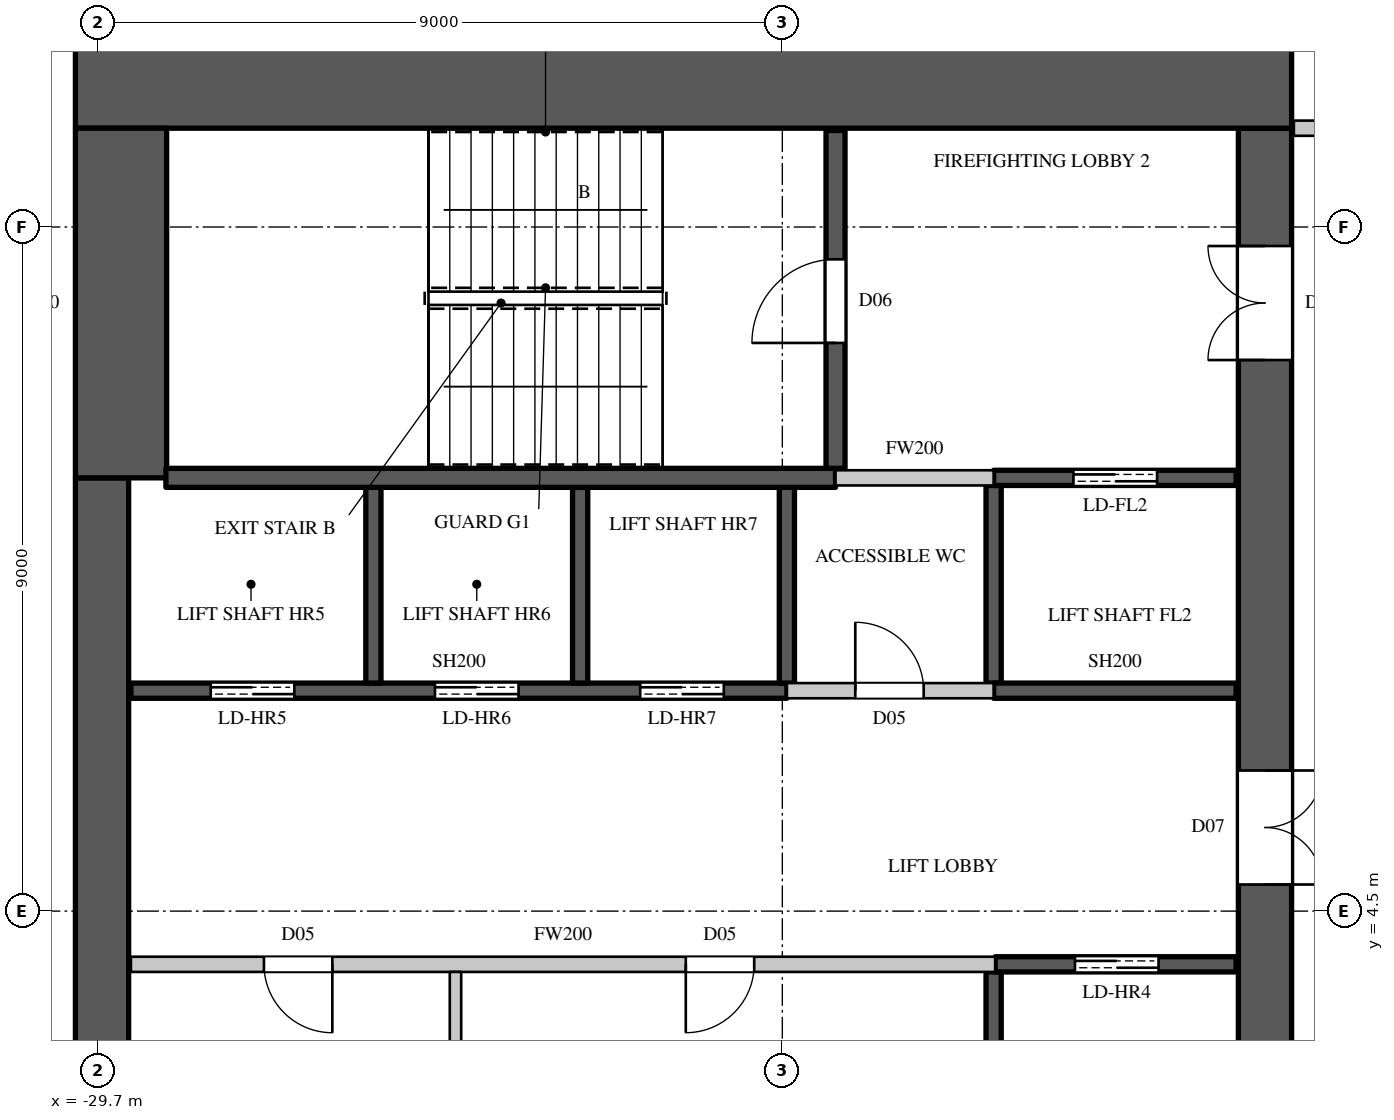
"""IFC4 building model, lengths in metres.
Left out: names, types, materials, properties, quantities, classifications, styles, units other than length and angle.
Written with IfcOpenShell. Run it as: python <this file> out.ifc"""

import sys

from ifc_helpers import new_model, si_unit, direction, frame, frame_2d, origin, place, context, subcontext, project, spatial, rectangle, extrude, element, fill, save


model = new_model("IFC4")
c1 = context("Model", 3, precision=1e-05, world=origin(), true_north=direction((0.0, 1.0)))
c2 = subcontext(c1, "Body", "Model", "MODEL_VIEW")
j1 = project(units=[si_unit("LENGTHUNIT", "METRE"), si_unit("PLANEANGLEUNIT", "RADIAN")], contexts=[c1])
p1 = place(None, origin())
s1 = spatial("IfcSite", under=j1, at=p1, CompositionType="ELEMENT")
p2 = place(p1, origin())
s2 = spatial("IfcBuilding", under=s1, at=p2, CompositionType="ELEMENT")
p3 = place(p2, frame((0.0, 0.0, 259.8)))
s3 = spatial("IfcBuildingStorey", under=s2, at=p3, CompositionType="ELEMENT", Elevation=259.8)
p4 = place(p3, frame((-30.0, 15.4, 0.0), z_axis=(0.0, 0.0, 1.0), x_axis=(1.0, 0.0, 0.0)))
e1 = element("IfcWall", 1, at=p4, inside=s3, PredefinedType="SHEAR", context=c2, shape_type="SweptSolid", body=[
    extrude(rectangle(XDim=16.0, YDim=1.2, at=frame_2d((8.0, 0.0))), origin(), (0.0, 0.0, 1.0), 4.1),
])
p5 = place(p3, frame((-14.35, -14.8, 0.0), z_axis=(0.0, 0.0, 1.0), x_axis=(0.0, 1.0, 0.0)))
e2 = element("IfcWall", 2, at=p5, inside=s3, PredefinedType="SHEAR", context=c2, shape_type="SweptSolid", body=[
    extrude(rectangle(XDim=29.6, YDim=0.7, at=frame_2d((14.8, 0.0))), origin(), (0.0, 0.0, 1.0), 4.1),
])
p6 = place(p5, frame((1.55, 0.0, 0.0)))
e3 = element("IfcOpeningElement", 3, at=p6, cuts=e2, PredefinedType="OPENING", context=c2, shape_type="SweptSolid", body=[
    extrude(rectangle(XDim=1.5, YDim=2.4, at=frame_2d((0.75, 1.2))), frame((0.0, 0.36, 0.0), z_axis=(0.0, -1.0, 0.0), x_axis=(1.0, 0.0, 0.0)), (0.0, 0.0, 1.0), 0.72),
])
p7 = place(p5, frame((26.55, 0.0, 0.0)))
e4 = element("IfcOpeningElement", 4, at=p7, cuts=e2, PredefinedType="OPENING", context=c2, shape_type="SweptSolid", body=[
    extrude(rectangle(XDim=1.5, YDim=2.4, at=frame_2d((0.75, 1.2))), frame((0.0, 0.36, 0.0), z_axis=(0.0, -1.0, 0.0), x_axis=(1.0, 0.0, 0.0)), (0.0, 0.0, 1.0), 0.72),
])
p8 = place(p5, frame((8.45, 0.0, 0.0)))
e5 = element("IfcOpeningElement", 5, at=p8, cuts=e2, PredefinedType="OPENING", context=c2, shape_type="SweptSolid", body=[
    extrude(rectangle(XDim=1.5, YDim=2.4, at=frame_2d((0.75, 1.2))), frame((0.0, 0.36, 0.0), z_axis=(0.0, -1.0, 0.0), x_axis=(1.0, 0.0, 0.0)), (0.0, 0.0, 1.0), 0.72),
])
p9 = place(p5, frame((19.65, 0.0, 0.0)))
e6 = element("IfcOpeningElement", 6, at=p9, cuts=e2, PredefinedType="OPENING", context=c2, shape_type="SweptSolid", body=[
    extrude(rectangle(XDim=1.5, YDim=2.4, at=frame_2d((0.75, 1.2))), frame((0.0, 0.36, 0.0), z_axis=(0.0, -1.0, 0.0), x_axis=(1.0, 0.0, 0.0)), (0.0, 0.0, 1.0), 0.72),
])
p10 = place(p5, frame((14.5, 0.0, 0.0)))
e7 = element("IfcOpeningElement", 7, at=p10, cuts=e2, PredefinedType="OPENING", context=c2, shape_type="SweptSolid", body=[
    extrude(rectangle(XDim=0.6, YDim=2.0, at=frame_2d((0.3, 1.0))), frame((0.0, 0.36, 0.0), z_axis=(0.0, -1.0, 0.0), x_axis=(1.0, 0.0, 0.0)), (0.0, 0.0, 1.0), 0.72),
])
p11 = place(p3, frame((-29.65, -10.2, 0.0), z_axis=(0.0, 0.0, 1.0), x_axis=(0.0, 1.0, 0.0)))
e8 = element("IfcWall", 8, at=p11, inside=s3, PredefinedType="SHEAR", context=c2, shape_type="SweptSolid", body=[
    extrude(rectangle(XDim=20.4, YDim=0.7, at=frame_2d((10.2, 0.0))), origin(), (0.0, 0.0, 1.0), 4.1),
])
p12 = place(p3, frame((-29.4, 10.2, 0.0), z_axis=(0.0, 0.0, 1.0), x_axis=(0.0, 1.0, 0.0)))
e9 = element("IfcWall", 9, at=p12, inside=s3, PredefinedType="SHEAR", context=c2, shape_type="SweptSolid", body=[
    extrude(rectangle(XDim=4.6, YDim=1.2, at=frame_2d((2.3, 0.0))), origin(), (0.0, 0.0, 1.0), 4.1),
])
p13 = place(p3, frame((-29.27, 3.8, 0.0), z_axis=(0.0, 0.0, 1.0), x_axis=(1.0, 0.0, 0.0)))
e10 = element("IfcWall", 10, at=p13, inside=s3, PredefinedType="PARTITIONING", context=c2, shape_type="SweptSolid", body=[
    extrude(rectangle(XDim=11.37, YDim=0.2, at=frame_2d((5.685, 0.0))), origin(), (0.0, 0.0, 1.0), 3.8),
])
p14 = place(p13, frame((1.75, 0.0, 0.0)))
e11 = element("IfcOpeningElement", 11, at=p14, cuts=e10, PredefinedType="OPENING", context=c2, shape_type="SweptSolid", body=[
    extrude(rectangle(XDim=0.9, YDim=2.2, at=frame_2d((0.45, 1.1))), frame((0.0, 0.11, 0.0), z_axis=(0.0, -1.0, 0.0), x_axis=(1.0, 0.0, 0.0)), (0.0, 0.0, 1.0), 0.22),
])
p15 = place(p13, frame((7.3, 0.0, 0.0)))
e12 = element("IfcOpeningElement", 12, at=p15, cuts=e10, PredefinedType="OPENING", context=c2, shape_type="SweptSolid", body=[
    extrude(rectangle(XDim=0.9, YDim=2.2, at=frame_2d((0.45, 1.1))), frame((0.0, 0.11, 0.0), z_axis=(0.0, -1.0, 0.0), x_axis=(1.0, 0.0, 0.0)), (0.0, 0.0, 1.0), 0.22),
])
p16 = place(p3, frame((-20.64, 7.4, 0.0), z_axis=(0.0, 0.0, 1.0), x_axis=(1.0, 0.0, 0.0)))
e13 = element("IfcWall", 13, at=p16, inside=s3, PredefinedType="PARTITIONING", context=c2, shape_type="SweptSolid", body=[
    extrude(rectangle(XDim=2.72, YDim=0.2, at=frame_2d((1.36, 0.0))), origin(), (0.0, 0.0, 1.0), 3.8),
])
p17 = place(p16, frame((0.9, 0.0, 0.0)))
e14 = element("IfcOpeningElement", 14, at=p17, cuts=e13, PredefinedType="OPENING", context=c2, shape_type="SweptSolid", body=[
    extrude(rectangle(XDim=0.9, YDim=2.2, at=frame_2d((0.45, 1.1))), frame((0.0, 0.11, 0.0), z_axis=(0.0, -1.0, 0.0), x_axis=(1.0, 0.0, 0.0)), (0.0, 0.0, 1.0), 0.22),
])
p18 = place(p3, frame((-20.0, 10.2, 0.0), z_axis=(0.0, 0.0, 1.0), x_axis=(1.0, 0.0, 0.0)))
e15 = element("IfcWall", 15, at=p18, inside=s3, PredefinedType="PARTITIONING", context=c2, shape_type="SweptSolid", body=[
    extrude(rectangle(XDim=2.08, YDim=0.2, at=frame_2d((1.04, 0.0))), origin(), (0.0, 0.0, 1.0), 3.8),
])
p19 = place(p3, frame((-13.97, 14.8, 0.0), z_axis=(0.0, 0.0, 1.0), x_axis=(1.0, 0.0, 0.0)))
e16 = element("IfcWall", 16, at=p19, inside=s3, PredefinedType="PARTITIONING", context=c2, shape_type="SweptSolid", body=[
    extrude(rectangle(XDim=3.07, YDim=0.2, at=frame_2d((1.535, 0.0))), origin(), (0.0, 0.0, 1.0), 3.8),
])
p20 = place(p3, frame((-25.0, 1.1, 0.0), z_axis=(0.0, 0.0, 1.0), x_axis=(0.0, 1.0, 0.0)))
e17 = element("IfcWall", 17, at=p20, inside=s3, PredefinedType="PARTITIONING", context=c2, shape_type="SweptSolid", body=[
    extrude(rectangle(XDim=2.6, YDim=0.15, at=frame_2d((1.3, 0.0))), origin(), (0.0, 0.0, 1.0), 3.8),
])
p21 = place(p3, frame((-29.27, 7.4, 0.0), z_axis=(0.0, 0.0, 1.0), x_axis=(1.0, 0.0, 0.0)))
e18 = element("IfcWall", 18, at=p21, inside=s3, PredefinedType="SHEAR", context=c2, shape_type="SweptSolid", body=[
    extrude(rectangle(XDim=8.63, YDim=0.2, at=frame_2d((4.315, 0.0))), origin(), (0.0, 0.0, 1.0), 3.8),
])
p22 = place(p21, frame((1.05, 0.0, 0.0)))
e19 = element("IfcOpeningElement", 19, at=p22, cuts=e18, PredefinedType="OPENING", context=c2, shape_type="SweptSolid", body=[
    extrude(rectangle(XDim=1.1, YDim=2.2, at=frame_2d((0.55, 1.1))), frame((0.0, 0.11, 0.0), z_axis=(0.0, -1.0, 0.0), x_axis=(1.0, 0.0, 0.0)), (0.0, 0.0, 1.0), 0.22),
])
p23 = place(p21, frame((4.0, 0.0, 0.0)))
e20 = element("IfcOpeningElement", 20, at=p23, cuts=e18, PredefinedType="OPENING", context=c2, shape_type="SweptSolid", body=[
    extrude(rectangle(XDim=1.1, YDim=2.2, at=frame_2d((0.55, 1.1))), frame((0.0, 0.11, 0.0), z_axis=(0.0, -1.0, 0.0), x_axis=(1.0, 0.0, 0.0)), (0.0, 0.0, 1.0), 0.22),
])
p24 = place(p21, frame((6.7, 0.0, 0.0)))
e21 = element("IfcOpeningElement", 21, at=p24, cuts=e18, PredefinedType="OPENING", context=c2, shape_type="SweptSolid", body=[
    extrude(rectangle(XDim=1.1, YDim=2.2, at=frame_2d((0.55, 1.1))), frame((0.0, 0.11, 0.0), z_axis=(0.0, -1.0, 0.0), x_axis=(1.0, 0.0, 0.0)), (0.0, 0.0, 1.0), 0.22),
])
for number, where, z_axis, x_axis in (
    (22, (-26.08, 7.5, 0.0), (0.0, 0.0, 1.0), (0.0, 1.0, 0.0)),
    (23, (-23.36, 7.5, 0.0), (0.0, 0.0, 1.0), (0.0, 1.0, 0.0)),
):
    element("IfcWall", number, at=place(p3, frame(where, z_axis=z_axis, x_axis=x_axis)), inside=s3, PredefinedType="SHEAR", context=c2, shape_type="SweptSolid", body=[
        extrude(rectangle(XDim=2.575, YDim=0.2, at=frame_2d((1.288, 0.0))), origin(), (0.0, 0.0, 1.0), 4.1),
    ])
p25 = place(p3, frame((-20.64, 7.5, 0.0), z_axis=(0.0, 0.0, 1.0), x_axis=(0.0, 1.0, 0.0)))
e24 = element("IfcWall", 24, at=p25, inside=s3, PredefinedType="SHEAR", context=c2, shape_type="SweptSolid", body=[
    extrude(rectangle(XDim=2.575, YDim=0.2, at=frame_2d((1.288, 0.0))), origin(), (0.0, 0.0, 1.0), 3.8),
])
p26 = place(p3, frame((-17.92, 1.1, 0.0), z_axis=(0.0, 0.0, 1.0), x_axis=(0.0, 1.0, 0.0)))
e25 = element("IfcWall", 25, at=p26, inside=s3, PredefinedType="SHEAR", context=c2, shape_type="SweptSolid", body=[
    extrude(rectangle(XDim=2.6, YDim=0.2, at=frame_2d((1.3, 0.0))), origin(), (0.0, 0.0, 1.0), 3.8),
])
p27 = place(p3, frame((-17.9, 3.8, 0.0), z_axis=(0.0, 0.0, 1.0), x_axis=(1.0, 0.0, 0.0)))
e26 = element("IfcWall", 26, at=p27, inside=s3, PredefinedType="SHEAR", context=c2, shape_type="SweptSolid", body=[
    extrude(rectangle(XDim=3.17, YDim=0.2, at=frame_2d((1.585, 0.0))), origin(), (0.0, 0.0, 1.0), 3.8),
])
p28 = place(p27, frame((1.05, 0.0, 0.0)))
e27 = element("IfcOpeningElement", 27, at=p28, cuts=e26, PredefinedType="OPENING", context=c2, shape_type="SweptSolid", body=[
    extrude(rectangle(XDim=1.1, YDim=2.2, at=frame_2d((0.55, 1.1))), frame((0.0, 0.11, 0.0), z_axis=(0.0, -1.0, 0.0), x_axis=(1.0, 0.0, 0.0)), (0.0, 0.0, 1.0), 0.22),
])
p29 = place(p3, frame((-17.92, 7.5, 0.0), z_axis=(0.0, 0.0, 1.0), x_axis=(0.0, 1.0, 0.0)))
e28 = element("IfcWall", 28, at=p29, inside=s3, PredefinedType="SHEAR", context=c2, shape_type="SweptSolid", body=[
    extrude(rectangle(XDim=2.6, YDim=0.2, at=frame_2d((1.3, 0.0))), origin(), (0.0, 0.0, 1.0), 3.8),
])
p30 = place(p3, frame((-17.92, 7.4, 0.0), z_axis=(0.0, 0.0, 1.0), x_axis=(1.0, 0.0, 0.0)))
e29 = element("IfcWall", 29, at=p30, inside=s3, PredefinedType="SHEAR", context=c2, shape_type="SweptSolid", body=[
    extrude(rectangle(XDim=3.19, YDim=0.2, at=frame_2d((1.595, 0.0))), origin(), (0.0, 0.0, 1.0), 3.8),
])
p31 = place(p3, frame((-17.92, 10.2, 0.0), z_axis=(0.0, 0.0, 1.0), x_axis=(1.0, 0.0, 0.0)))
e30 = element("IfcWall", 30, at=p31, inside=s3, PredefinedType="SHEAR", context=c2, shape_type="SweptSolid", body=[
    extrude(rectangle(XDim=3.19, YDim=0.2, at=frame_2d((1.595, 0.0))), origin(), (0.0, 0.0, 1.0), 3.8),
])
p32 = place(p31, frame((1.05, 0.0, 0.0)))
e31 = element("IfcOpeningElement", 31, at=p32, cuts=e30, PredefinedType="OPENING", context=c2, shape_type="SweptSolid", body=[
    extrude(rectangle(XDim=1.1, YDim=2.2, at=frame_2d((0.55, 1.1))), frame((0.0, 0.11, 0.0), z_axis=(0.0, -1.0, 0.0), x_axis=(1.0, 0.0, 0.0)), (0.0, 0.0, 1.0), 0.22),
])
p33 = place(p3, frame((-28.81, 10.2, 0.0), z_axis=(0.0, 0.0, 1.0), x_axis=(1.0, 0.0, 0.0)))
e32 = element("IfcWall", 32, at=p33, inside=s3, PredefinedType="SHEAR", context=c2, shape_type="SweptSolid", body=[
    extrude(rectangle(XDim=8.81, YDim=0.25, at=frame_2d((4.405, 0.0))), origin(), (0.0, 0.0, 1.0), 3.8),
])
p34 = place(p3, frame((-20.0, 10.325, 0.0), z_axis=(0.0, 0.0, 1.0), x_axis=(0.0, 1.0, 0.0)))
e33 = element("IfcWall", 33, at=p34, inside=s3, PredefinedType="SHEAR", context=c2, shape_type="SweptSolid", body=[
    extrude(rectangle(XDim=4.445, YDim=0.25, at=frame_2d((2.223, 0.0))), origin(), (0.0, 0.0, 1.0), 3.8),
])
p35 = place(p34, frame((1.65, 0.0, 0.0)))
e34 = element("IfcOpeningElement", 34, at=p35, cuts=e33, PredefinedType="OPENING", context=c2, shape_type="SweptSolid", body=[
    extrude(rectangle(XDim=1.1, YDim=2.2, at=frame_2d((0.55, 1.1))), frame((0.0, 0.135, 0.0), z_axis=(0.0, -1.0, 0.0), x_axis=(1.0, 0.0, 0.0)), (0.0, 0.0, 1.0), 0.27),
])
p36 = place(p35, origin())
e35 = element("IfcDoor", 35, at=p36, inside=s3, OperationType="SINGLE_SWING_LEFT", PredefinedType="DOOR", context=c2, shape_type="SweptSolid", body=[
    extrude(rectangle(XDim=1.1, YDim=2.2, at=frame_2d((0.55, 1.1))), frame((0.0, 0.025, 0.0), z_axis=(0.0, -1.0, 0.0), x_axis=(1.0, 0.0, 0.0)), (0.0, 0.0, 1.0), 0.05),
])
fill(e34, e35)
p37 = place(p14, origin())
e36 = element("IfcDoor", 36, at=p37, inside=s3, OperationType="SINGLE_SWING_LEFT", PredefinedType="DOOR", context=c2, shape_type="SweptSolid", body=[
    extrude(rectangle(XDim=0.9, YDim=2.2, at=frame_2d((0.45, 1.1))), frame((0.0, 0.025, 0.0), z_axis=(0.0, -1.0, 0.0), x_axis=(1.0, 0.0, 0.0)), (0.0, 0.0, 1.0), 0.05),
])
fill(e11, e36)
p38 = place(p15, origin())
e37 = element("IfcDoor", 37, at=p38, inside=s3, OperationType="SINGLE_SWING_RIGHT", PredefinedType="DOOR", context=c2, shape_type="SweptSolid", body=[
    extrude(rectangle(XDim=0.9, YDim=2.2, at=frame_2d((0.45, 1.1))), frame((0.0, 0.025, 0.0), z_axis=(0.0, -1.0, 0.0), x_axis=(1.0, 0.0, 0.0)), (0.0, 0.0, 1.0), 0.05),
])
fill(e12, e37)
p39 = place(p17, origin())
e38 = element("IfcDoor", 38, at=p39, inside=s3, OperationType="SINGLE_SWING_LEFT", PredefinedType="DOOR", context=c2, shape_type="SweptSolid", body=[
    extrude(rectangle(XDim=0.9, YDim=2.2, at=frame_2d((0.45, 1.1))), frame((0.0, 0.025, 0.0), z_axis=(0.0, -1.0, 0.0), x_axis=(1.0, 0.0, 0.0)), (0.0, 0.0, 1.0), 0.05),
])
fill(e14, e38)
p40 = place(p28, origin())
e39 = element("IfcDoor", 39, at=p40, inside=s3, OperationType="DOUBLE_DOOR_SLIDING", PredefinedType="DOOR", context=c2, shape_type="SweptSolid", body=[
    extrude(rectangle(XDim=1.1, YDim=2.2, at=frame_2d((0.55, 1.1))), frame((0.0, 0.025, 0.0), z_axis=(0.0, -1.0, 0.0), x_axis=(1.0, 0.0, 0.0)), (0.0, 0.0, 1.0), 0.05),
])
fill(e27, e39)
p41 = place(p22, origin())
e40 = element("IfcDoor", 40, at=p41, inside=s3, OperationType="DOUBLE_DOOR_SLIDING", PredefinedType="DOOR", context=c2, shape_type="SweptSolid", body=[
    extrude(rectangle(XDim=1.1, YDim=2.2, at=frame_2d((0.55, 1.1))), frame((0.0, 0.025, 0.0), z_axis=(0.0, -1.0, 0.0), x_axis=(1.0, 0.0, 0.0)), (0.0, 0.0, 1.0), 0.05),
])
fill(e19, e40)
p42 = place(p23, origin())
e41 = element("IfcDoor", 41, at=p42, inside=s3, OperationType="DOUBLE_DOOR_SLIDING", PredefinedType="DOOR", context=c2, shape_type="SweptSolid", body=[
    extrude(rectangle(XDim=1.1, YDim=2.2, at=frame_2d((0.55, 1.1))), frame((0.0, 0.025, 0.0), z_axis=(0.0, -1.0, 0.0), x_axis=(1.0, 0.0, 0.0)), (0.0, 0.0, 1.0), 0.05),
])
fill(e20, e41)
p43 = place(p24, origin())
e42 = element("IfcDoor", 42, at=p43, inside=s3, OperationType="DOUBLE_DOOR_SLIDING", PredefinedType="DOOR", context=c2, shape_type="SweptSolid", body=[
    extrude(rectangle(XDim=1.1, YDim=2.2, at=frame_2d((0.55, 1.1))), frame((0.0, 0.025, 0.0), z_axis=(0.0, -1.0, 0.0), x_axis=(1.0, 0.0, 0.0)), (0.0, 0.0, 1.0), 0.05),
])
fill(e21, e42)
p44 = place(p32, origin())
e43 = element("IfcDoor", 43, at=p44, inside=s3, OperationType="DOUBLE_DOOR_SLIDING", PredefinedType="DOOR", context=c2, shape_type="SweptSolid", body=[
    extrude(rectangle(XDim=1.1, YDim=2.2, at=frame_2d((0.55, 1.1))), frame((0.0, 0.025, 0.0), z_axis=(0.0, -1.0, 0.0), x_axis=(1.0, 0.0, 0.0)), (0.0, 0.0, 1.0), 0.05),
])
fill(e31, e43)
p45 = place(p7, origin())
e44 = element("IfcDoor", 44, at=p45, inside=s3, OperationType="DOUBLE_DOOR_SINGLE_SWING", PredefinedType="DOOR", context=c2, shape_type="SweptSolid", body=[
    extrude(rectangle(XDim=1.5, YDim=2.4, at=frame_2d((0.75, 1.2))), frame((0.0, 0.345, 0.0), z_axis=(0.0, -1.0, 0.0), x_axis=(1.0, 0.0, 0.0)), (0.0, 0.0, 1.0), 0.05),
])
fill(e4, e44)
p46 = place(p9, origin())
e45 = element("IfcDoor", 45, at=p46, inside=s3, OperationType="DOUBLE_DOOR_SINGLE_SWING", PredefinedType="DOOR", context=c2, shape_type="SweptSolid", body=[
    extrude(rectangle(XDim=1.5, YDim=2.4, at=frame_2d((0.75, 1.2))), frame((0.0, -0.295, 0.0), z_axis=(0.0, -1.0, 0.0), x_axis=(1.0, 0.0, 0.0)), (0.0, 0.0, 1.0), 0.05),
])
fill(e6, e45)
save(model, sys.argv[1])
